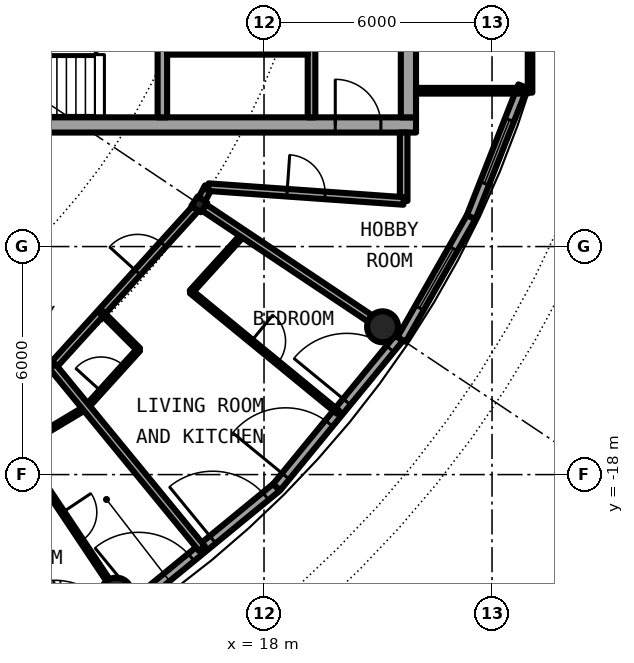
"""IFC4 building model, lengths in metres.
Left out: names, types, materials, properties, quantities, classifications, styles, units other than length and angle.
Written with IfcOpenShell. Run it as: python <this file> out.ifc"""

import sys

from ifc_helpers import new_model, si_unit, direction, frame, frame_2d, origin, origin_2d, place, context, subcontext, project, spatial, rectangle, hollow_circle, i_section, extrude, element, fill, save


model = new_model("IFC4")
c1 = context("Model", 3, precision=1e-05, world=origin(), true_north=direction((0.0, 1.0)))
c2 = subcontext(c1, "Body", "Model", "MODEL_VIEW")
j1 = project(units=[si_unit("LENGTHUNIT", "METRE"), si_unit("PLANEANGLEUNIT", "RADIAN")], contexts=[c1])
p1 = place(None, origin())
s1 = spatial("IfcSite", under=j1, at=p1, CompositionType="ELEMENT")
p2 = place(p1, origin())
s2 = spatial("IfcBuilding", under=s1, at=p2, CompositionType="ELEMENT")
p3 = place(p2, frame((0.0, 0.0, 237.1)))
s3 = spatial("IfcBuildingStorey", under=s2, at=p3, CompositionType="ELEMENT", Elevation=237.1)
for number, where, z_axis, x_axis in (
    (1, (14.112, -21.119, 0.0), (0.0, 0.0, 1.0), (1.0, 0.0, 0.0)),
    (2, (21.119, -14.112, 0.0), (0.0, 0.0, 1.0), (1.0, 0.0, 0.0)),
):
    element("IfcColumn", number, at=place(p3, frame(where, z_axis=z_axis, x_axis=x_axis)), inside=s3, PredefinedType="COLUMN", context=c2, shape_type="SweptSolid", body=[
        extrude(hollow_circle(Radius=0.406, WallThickness=0.03, at=origin_2d()), origin(), (0.0, 0.0, 1.0), 3.05),
    ])
p4 = place(p3, frame((16.297, -10.889, 0.0), z_axis=(0.0, 0.0, 1.0), x_axis=(0.831469612303, -0.55557023302, 0.0)))
e3 = element("IfcColumn", 3, at=p4, inside=s3, PredefinedType="COLUMN", context=c2, shape_type="SweptSolid", body=[
    extrude(i_section(OverallWidth=0.3, OverallDepth=0.3, WebThickness=0.011, FlangeThickness=0.019, FilletRadius=0.027, at=origin_2d()), origin(), (0.0, 0.0, 1.0), 3.05),
])
p5 = place(p3, frame((14.403, -21.556, 0.0), z_axis=(0.0, 0.0, 1.0), x_axis=(0.77306189429, 0.63433059803, 0.0)))
e4 = element("IfcWall", 4, at=p5, inside=s3, PredefinedType="SOLIDWALL", context=c2, shape_type="SweptSolid", body=[
    extrude(rectangle(XDim=5.082, YDim=0.25, at=frame_2d((2.541, 0.0))), origin(), (0.0, 0.0, 1.0), 2.7),
])
p6 = place(p5, frame((0.374, 0.0, 0.0)))
e5 = element("IfcOpeningElement", 5, at=p6, cuts=e4, PredefinedType="OPENING", context=c2, shape_type="SweptSolid", body=[
    extrude(rectangle(XDim=1.8, YDim=2.2, at=frame_2d((0.9, 1.1))), frame((0.0, 0.135, 0.0), z_axis=(0.0, -1.0, 0.0), x_axis=(1.0, 0.0, 0.0)), (0.0, 0.0, 1.0), 0.27),
])
p7 = place(p5, frame((2.909, 0.0, 0.0)))
e6 = element("IfcOpeningElement", 6, at=p7, cuts=e4, PredefinedType="OPENING", context=c2, shape_type="SweptSolid", body=[
    extrude(rectangle(XDim=1.8, YDim=2.2, at=frame_2d((0.9, 1.1))), frame((0.0, 0.135, 0.0), z_axis=(0.0, -1.0, 0.0), x_axis=(1.0, 0.0, 0.0)), (0.0, 0.0, 1.0), 0.27),
])
p8 = place(p3, frame((18.332, -18.332, 0.0), z_axis=(0.0, 0.0, 1.0), x_axis=(0.63433059803, 0.77306189429, 0.0)))
e7 = element("IfcWall", 7, at=p8, inside=s3, PredefinedType="SOLIDWALL", context=c2, shape_type="SweptSolid", body=[
    extrude(rectangle(XDim=5.082, YDim=0.25, at=frame_2d((2.541, 0.0))), origin(), (0.0, 0.0, 1.0), 2.7),
])
p9 = place(p8, frame((0.374, 0.0, 0.0)))
e8 = element("IfcOpeningElement", 8, at=p9, cuts=e7, PredefinedType="OPENING", context=c2, shape_type="SweptSolid", body=[
    extrude(rectangle(XDim=1.8, YDim=2.2, at=frame_2d((0.9, 1.1))), frame((0.0, 0.135, 0.0), z_axis=(0.0, -1.0, 0.0), x_axis=(1.0, 0.0, 0.0)), (0.0, 0.0, 1.0), 0.27),
])
p10 = place(p8, frame((2.909, 0.0, 0.0)))
e9 = element("IfcOpeningElement", 9, at=p10, cuts=e7, PredefinedType="OPENING", context=c2, shape_type="SweptSolid", body=[
    extrude(rectangle(XDim=1.8, YDim=2.2, at=frame_2d((0.9, 1.1))), frame((0.0, 0.135, 0.0), z_axis=(0.0, -1.0, 0.0), x_axis=(1.0, 0.0, 0.0)), (0.0, 0.0, 1.0), 0.27),
])
p11 = place(p3, frame((21.618, -14.445, 0.0), z_axis=(0.0, 0.0, 1.0), x_axis=(0.495031435966, 0.868875064325, 0.0)))
e10 = element("IfcWall", 10, at=p11, inside=s3, PredefinedType="SOLIDWALL", context=c2, shape_type="SweptSolid", body=[
    extrude(rectangle(XDim=3.705, YDim=0.25, at=frame_2d((1.853, 0.0))), origin(), (0.0, 0.0, 1.0), 2.7),
])
p12 = place(p11, frame((0.952, 0.0, 0.3)))
e11 = element("IfcOpeningElement", 11, at=p12, cuts=e10, PredefinedType="OPENING", context=c2, shape_type="SweptSolid", body=[
    extrude(rectangle(XDim=1.8, YDim=2.1, at=frame_2d((0.9, 1.05))), frame((0.0, 0.135, 0.0), z_axis=(0.0, -1.0, 0.0), x_axis=(1.0, 0.0, 0.0)), (0.0, 0.0, 1.0), 0.27),
])
p13 = place(p3, frame((23.452, -11.226, 0.0), z_axis=(0.0, 0.0, 1.0), x_axis=(0.366351636034, 0.930476479432, 0.0)))
e12 = element("IfcWall", 12, at=p13, inside=s3, PredefinedType="SOLIDWALL", context=c2, shape_type="SweptSolid", body=[
    extrude(rectangle(XDim=3.705, YDim=0.25, at=frame_2d((1.852, 0.0))), origin(), (0.0, 0.0, 1.0), 2.7),
])
p14 = place(p13, frame((0.952, 0.0, 0.3)))
e13 = element("IfcOpeningElement", 13, at=p14, cuts=e12, PredefinedType="OPENING", context=c2, shape_type="SweptSolid", body=[
    extrude(rectangle(XDim=1.8, YDim=2.1, at=frame_2d((0.9, 1.05))), frame((0.0, 0.135, 0.0), z_axis=(0.0, -1.0, 0.0), x_axis=(1.0, 0.0, 0.0)), (0.0, 0.0, 1.0), 0.27),
])
p15 = place(p3, frame((8.6, -8.8, 0.0), z_axis=(0.0, 0.0, 1.0), x_axis=(1.0, 0.0, 0.0)))
e14 = element("IfcWall", 14, at=p15, inside=s3, PredefinedType="SHEAR", context=c2, shape_type="SweptSolid", body=[
    extrude(rectangle(XDim=13.4, YDim=0.4, at=frame_2d((6.7, 0.0))), origin(), (0.0, 0.0, 1.0), 3.05),
])
p16 = place(p15, frame((11.275, 0.0, 0.0)))
e15 = element("IfcOpeningElement", 15, at=p16, cuts=e14, PredefinedType="OPENING", context=c2, shape_type="SweptSolid", body=[
    extrude(rectangle(XDim=1.2, YDim=2.3, at=frame_2d((0.6, 1.15))), frame((0.0, 0.21, 0.0), z_axis=(0.0, -1.0, 0.0), x_axis=(1.0, 0.0, 0.0)), (0.0, 0.0, 1.0), 0.42),
])
p17 = place(p3, frame((21.8, 8.6, 0.0), z_axis=(0.0, 0.0, 1.0), x_axis=(0.0, -1.0, 0.0)))
e16 = element("IfcWall", 16, at=p17, inside=s3, PredefinedType="SHEAR", context=c2, shape_type="SweptSolid", body=[
    extrude(rectangle(XDim=17.2, YDim=0.4, at=frame_2d((8.6, 0.0))), origin(), (0.0, 0.0, 1.0), 3.05),
])
p18 = place(p17, frame((7.7, 0.0, 0.0)))
e17 = element("IfcOpeningElement", 17, at=p18, cuts=e16, PredefinedType="OPENING", context=c2, shape_type="SweptSolid", body=[
    extrude(rectangle(XDim=1.8, YDim=2.3, at=frame_2d((0.9, 1.15))), frame((0.0, 0.21, 0.0), z_axis=(0.0, -1.0, 0.0), x_axis=(1.0, 0.0, 0.0)), (0.0, 0.0, 1.0), 0.42),
])
p19 = place(p3, frame((15.325, -8.6, 0.0), z_axis=(0.0, 0.0, 1.0), x_axis=(0.0, 1.0, 0.0)))
e18 = element("IfcWall", 18, at=p19, inside=s3, PredefinedType="SHEAR", context=c2, shape_type="SweptSolid", body=[
    extrude(rectangle(XDim=3.95, YDim=0.25, at=frame_2d((1.975, 0.0))), origin(), (0.0, 0.0, 1.0), 3.05),
])
p20 = place(p19, frame((2.025, 0.0, 0.0)))
e19 = element("IfcOpeningElement", 19, at=p20, cuts=e18, PredefinedType="OPENING", context=c2, shape_type="SweptSolid", body=[
    extrude(rectangle(XDim=1.2, YDim=2.3, at=frame_2d((0.6, 1.15))), frame((0.0, 0.135, 0.0), z_axis=(0.0, -1.0, 0.0), x_axis=(1.0, 0.0, 0.0)), (0.0, 0.0, 1.0), 0.27),
])
p21 = place(p3, frame((19.25, -8.6, 0.0), z_axis=(0.0, 0.0, 1.0), x_axis=(0.0, 1.0, 0.0)))
e20 = element("IfcWall", 20, at=p21, inside=s3, PredefinedType="SOLIDWALL", context=c2, shape_type="SweptSolid", body=[
    extrude(rectangle(XDim=7.025, YDim=0.2, at=frame_2d((3.513, 0.0))), origin(), (0.0, 0.0, 1.0), 2.7),
])
p22 = place(p21, frame((2.35, 0.0, 0.0)))
e21 = element("IfcOpeningElement", 21, at=p22, cuts=e20, PredefinedType="OPENING", context=c2, shape_type="SweptSolid", body=[
    extrude(rectangle(XDim=1.1, YDim=2.3, at=frame_2d((0.55, 1.15))), frame((0.0, 0.11, 0.0), z_axis=(0.0, -1.0, 0.0), x_axis=(1.0, 0.0, 0.0)), (0.0, 0.0, 1.0), 0.22),
])
p23 = place(p3, frame((15.45, -6.875, 0.0), z_axis=(0.0, 0.0, 1.0), x_axis=(1.0, 0.0, 0.0)))
e22 = element("IfcWall", 22, at=p23, inside=s3, PredefinedType="PARTITIONING", context=c2, shape_type="SweptSolid", body=[
    extrude(rectangle(XDim=3.7, YDim=0.15, at=frame_2d((1.85, 0.0))), origin(), (0.0, 0.0, 1.0), 2.7),
])
p24 = place(p23, frame((1.4, 0.0, 0.0)))
e23 = element("IfcOpeningElement", 23, at=p24, cuts=e22, PredefinedType="OPENING", context=c2, shape_type="SweptSolid", body=[
    extrude(rectangle(XDim=0.9, YDim=2.3, at=frame_2d((0.45, 1.15))), frame((0.0, 0.085, 0.0), z_axis=(0.0, -1.0, 0.0), x_axis=(1.0, 0.0, 0.0)), (0.0, 0.0, 1.0), 0.17),
])
p25 = place(p3, frame((22.0, -7.9, 0.0), z_axis=(0.0, 0.0, 1.0), x_axis=(1.0, 0.0, 0.0)))
e24 = element("IfcWall", 24, at=p25, inside=s3, PredefinedType="PARTITIONING", context=c2, shape_type="SweptSolid", body=[
    extrude(rectangle(XDim=2.94, YDim=0.15, at=frame_2d((1.47, 0.0))), origin(), (0.0, 0.0, 1.0), 2.7),
])
p26 = place(p3, frame((25.0, -7.95, 0.0), z_axis=(0.0, 0.0, 1.0), x_axis=(0.0, 1.0, 0.0)))
e25 = element("IfcWall", 25, at=p26, inside=s3, PredefinedType="PARTITIONING", context=c2, shape_type="SweptSolid", body=[
    extrude(rectangle(XDim=15.9, YDim=0.12, at=frame_2d((7.95, 0.0))), origin(), (0.0, 0.0, 1.0), 2.7),
])
p27 = place(p26, frame((0.95, 0.0, 0.1)))
e26 = element("IfcOpeningElement", 26, at=p27, cuts=e25, PredefinedType="OPENING", context=c2, shape_type="SweptSolid", body=[
    extrude(rectangle(XDim=14.0, YDim=2.35, at=frame_2d((7.0, 1.175))), frame((0.0, 0.07, 0.0), z_axis=(0.0, -1.0, 0.0), x_axis=(1.0, 0.0, 0.0)), (0.0, 0.0, 1.0), 0.14),
])
p28 = place(p3, frame((21.675, -10.8, 0.0), z_axis=(0.0, 0.0, 1.0), x_axis=(0.0, 1.0, 0.0)))
e27 = element("IfcWall", 27, at=p28, inside=s3, PredefinedType="PARTITIONING", context=c2, shape_type="SweptSolid", body=[
    extrude(rectangle(XDim=1.8, YDim=0.2, at=frame_2d((0.9, 0.0))), origin(), (0.0, 0.0, 1.0), 2.7),
])
p29 = place(p3, frame((11.56, -17.289, 0.0), z_axis=(0.0, 0.0, 1.0), x_axis=(0.857713062192, 0.514128683254, 0.0)))
e28 = element("IfcWall", 28, at=p29, inside=s3, PredefinedType="PARTITIONING", context=c2, shape_type="SweptSolid", body=[
    extrude(rectangle(XDim=2.054, YDim=0.1, at=frame_2d((1.027, 0.0))), origin(), (0.0, 0.0, 1.0), 2.7),
])
p30 = place(p3, frame((13.322, -16.233, 0.0), z_axis=(0.0, 0.0, 1.0), x_axis=(0.671678456097, 0.74084279818, 0.0)))
e29 = element("IfcWall", 29, at=p30, inside=s3, PredefinedType="PARTITIONING", context=c2, shape_type="SweptSolid", body=[
    extrude(rectangle(XDim=2.054, YDim=0.1, at=frame_2d((1.027, 0.0))), origin(), (0.0, 0.0, 1.0), 2.7),
])
p31 = place(p30, frame((0.577, 0.0, 0.0)))
e30 = element("IfcOpeningElement", 30, at=p31, cuts=e29, PredefinedType="OPENING", context=c2, shape_type="SweptSolid", body=[
    extrude(rectangle(XDim=0.9, YDim=2.3, at=frame_2d((0.45, 1.15))), frame((0.0, 0.06, 0.0), z_axis=(0.0, -1.0, 0.0), x_axis=(1.0, 0.0, 0.0)), (0.0, 0.0, 1.0), 0.12),
])
p32 = place(p3, frame((16.082, -13.189, 0.0), z_axis=(0.0, 0.0, 1.0), x_axis=(0.671678456097, 0.74084279818, 0.0)))
e31 = element("IfcWall", 31, at=p32, inside=s3, PredefinedType="PARTITIONING", context=c2, shape_type="SweptSolid", body=[
    extrude(rectangle(XDim=2.054, YDim=0.1, at=frame_2d((1.027, 0.0))), origin(), (0.0, 0.0, 1.0), 2.7),
])
p33 = place(p3, frame((16.367, -10.756, 0.0), z_axis=(0.0, 0.0, 1.0), x_axis=(0.465802239822, 0.884888848035, 0.0)))
e32 = element("IfcWall", 32, at=p33, inside=s3, PredefinedType="PARTITIONING", context=c2, shape_type="SweptSolid", body=[
    extrude(rectangle(XDim=0.361, YDim=0.2, at=frame_2d((0.18, 0.0))), origin(), (0.0, 0.0, 1.0), 2.7),
])
p34 = place(p3, frame((7.495, -18.111, 0.0), z_axis=(0.0, 0.0, 1.0), x_axis=(0.85773600187, 0.514090411403, 0.0)))
e33 = element("IfcWall", 33, at=p34, inside=s3, PredefinedType="PARTITIONING", context=c2, shape_type="SweptSolid", body=[
    extrude(rectangle(XDim=5.758, YDim=0.2, at=frame_2d((2.879, 0.0))), origin(), (0.0, 0.0, 1.0), 2.45),
])
p35 = place(p34, frame((2.224, 0.0, 0.0)))
e34 = element("IfcOpeningElement", 34, at=p35, cuts=e33, PredefinedType="OPENING", context=c2, shape_type="SweptSolid", body=[
    extrude(rectangle(XDim=1.0, YDim=2.3, at=frame_2d((0.5, 1.15))), frame((0.0, 0.11, 0.0), z_axis=(0.0, -1.0, 0.0), x_axis=(1.0, 0.0, 0.0)), (0.0, 0.0, 1.0), 0.22),
])
p36 = place(p3, frame((12.434, -15.151, 0.0), z_axis=(0.0, 0.0, 1.0), x_axis=(0.671619657805, 0.740896102871, 0.0)))
e35 = element("IfcWall", 35, at=p36, inside=s3, PredefinedType="PARTITIONING", context=c2, shape_type="SweptSolid", body=[
    extrude(rectangle(XDim=5.6, YDim=0.2, at=frame_2d((2.8, 0.0))), origin(), (0.0, 0.0, 1.0), 2.45),
])
p37 = place(p36, frame((3.335, 0.0, 0.0)))
e36 = element("IfcOpeningElement", 36, at=p37, cuts=e35, PredefinedType="OPENING", context=c2, shape_type="SweptSolid", body=[
    extrude(rectangle(XDim=1.0, YDim=2.3, at=frame_2d((0.5, 1.15))), frame((0.0, 0.11, 0.0), z_axis=(0.0, -1.0, 0.0), x_axis=(1.0, 0.0, 0.0)), (0.0, 0.0, 1.0), 0.22),
])
p38 = place(p3, frame((16.535, -10.437, 0.0), z_axis=(0.0, 0.0, 1.0), x_axis=(0.997515141784, -0.070452408845, 0.0)))
e37 = element("IfcWall", 37, at=p38, inside=s3, PredefinedType="PARTITIONING", context=c2, shape_type="SweptSolid", body=[
    extrude(rectangle(XDim=5.153, YDim=0.2, at=frame_2d((2.576, 0.0))), origin(), (0.0, 0.0, 1.0), 2.7),
])
p39 = place(p38, frame((2.076, 0.0, 0.0)))
e38 = element("IfcOpeningElement", 38, at=p39, cuts=e37, PredefinedType="OPENING", context=c2, shape_type="SweptSolid", body=[
    extrude(rectangle(XDim=1.0, YDim=2.3, at=frame_2d((0.5, 1.15))), frame((0.0, 0.11, 0.0), z_axis=(0.0, -1.0, 0.0), x_axis=(1.0, 0.0, 0.0)), (0.0, 0.0, 1.0), 0.22),
])
p40 = place(p3, frame((11.56, -17.289, 0.0), z_axis=(0.0, 0.0, 1.0), x_axis=(0.555959489687, -0.831209387475, 0.0)))
e39 = element("IfcWall", 39, at=p40, inside=s3, PredefinedType="PARTITIONING", context=c2, shape_type="SweptSolid", body=[
    extrude(rectangle(XDim=4.203, YDim=0.1, at=frame_2d((2.102, 0.0))), origin(), (0.0, 0.0, 1.0), 2.7),
])
p41 = place(p40, frame((2.051, 0.0, 0.0)))
e40 = element("IfcOpeningElement", 40, at=p41, cuts=e39, PredefinedType="OPENING", context=c2, shape_type="SweptSolid", body=[
    extrude(rectangle(XDim=0.9, YDim=2.3, at=frame_2d((0.45, 1.15))), frame((0.0, 0.06, 0.0), z_axis=(0.0, -1.0, 0.0), x_axis=(1.0, 0.0, 0.0)), (0.0, 0.0, 1.0), 0.12),
])
p42 = place(p3, frame((12.432, -15.153, 0.0), z_axis=(0.0, 0.0, 1.0), x_axis=(0.634356436091, -0.773040692324, 0.0)))
e41 = element("IfcWall", 41, at=p42, inside=s3, PredefinedType="PARTITIONING", context=c2, shape_type="SweptSolid", body=[
    extrude(rectangle(XDim=6.2, YDim=0.2, at=frame_2d((3.1, 0.0))), origin(), (0.0, 0.0, 1.0), 2.7),
])
p43 = place(p3, frame((13.722, -13.73, 0.0), z_axis=(0.0, 0.0, 1.0), x_axis=(0.707458838269, -0.706754548733, 0.0)))
e42 = element("IfcWall", 42, at=p43, inside=s3, PredefinedType="PARTITIONING", context=c2, shape_type="SweptSolid", body=[
    extrude(rectangle(XDim=1.386, YDim=0.1, at=frame_2d((0.693, 0.0))), origin(), (0.0, 0.0, 1.0), 2.7),
])
p44 = place(p3, frame((16.081, -13.189, 0.0), z_axis=(0.0, 0.0, 1.0), x_axis=(0.773226150619, -0.634130365145, 0.0)))
e43 = element("IfcWall", 43, at=p44, inside=s3, PredefinedType="PARTITIONING", context=c2, shape_type="SweptSolid", body=[
    extrude(rectangle(XDim=5.002, YDim=0.1, at=frame_2d((2.501, 0.0))), origin(), (0.0, 0.0, 1.0), 2.7),
])
p45 = place(p44, frame((2.051, 0.0, 0.0)))
e44 = element("IfcOpeningElement", 44, at=p45, cuts=e43, PredefinedType="OPENING", context=c2, shape_type="SweptSolid", body=[
    extrude(rectangle(XDim=0.9, YDim=2.3, at=frame_2d((0.45, 1.15))), frame((0.0, 0.06, 0.0), z_axis=(0.0, -1.0, 0.0), x_axis=(1.0, 0.0, 0.0)), (0.0, 0.0, 1.0), 0.12),
])
p46 = place(p3, frame((16.422, -10.972, 0.0), z_axis=(0.0, 0.0, 1.0), x_axis=(0.831406006746, -0.555665413668, 0.0)))
e45 = element("IfcWall", 45, at=p46, inside=s3, PredefinedType="PARTITIONING", context=c2, shape_type="SweptSolid", body=[
    extrude(rectangle(XDim=5.251, YDim=0.2, at=frame_2d((2.625, 0.0))), origin(), (0.0, 0.0, 1.0), 2.7),
])
p47 = place(p6, origin())
e46 = element("IfcDoor", 46, at=p47, inside=s3, OperationType="SINGLE_SWING_LEFT", PredefinedType="DOOR", context=c2, shape_type="SweptSolid", body=[
    extrude(rectangle(XDim=1.8, YDim=2.2, at=frame_2d((0.9, 1.1))), frame((0.0, 0.025, 0.0), z_axis=(0.0, -1.0, 0.0), x_axis=(1.0, 0.0, 0.0)), (0.0, 0.0, 1.0), 0.05),
])
fill(e5, e46)
p48 = place(p7, origin())
e47 = element("IfcDoor", 47, at=p48, inside=s3, OperationType="SINGLE_SWING_LEFT", PredefinedType="DOOR", context=c2, shape_type="SweptSolid", body=[
    extrude(rectangle(XDim=1.8, YDim=2.2, at=frame_2d((0.9, 1.1))), frame((0.0, 0.025, 0.0), z_axis=(0.0, -1.0, 0.0), x_axis=(1.0, 0.0, 0.0)), (0.0, 0.0, 1.0), 0.05),
])
fill(e6, e47)
p49 = place(p9, origin())
e48 = element("IfcDoor", 48, at=p49, inside=s3, OperationType="SINGLE_SWING_LEFT", PredefinedType="DOOR", context=c2, shape_type="SweptSolid", body=[
    extrude(rectangle(XDim=1.8, YDim=2.2, at=frame_2d((0.9, 1.1))), frame((0.0, 0.025, 0.0), z_axis=(0.0, -1.0, 0.0), x_axis=(1.0, 0.0, 0.0)), (0.0, 0.0, 1.0), 0.05),
])
fill(e8, e48)
p50 = place(p10, origin())
e49 = element("IfcDoor", 49, at=p50, inside=s3, OperationType="SINGLE_SWING_LEFT", PredefinedType="DOOR", context=c2, shape_type="SweptSolid", body=[
    extrude(rectangle(XDim=1.8, YDim=2.2, at=frame_2d((0.9, 1.1))), frame((0.0, 0.025, 0.0), z_axis=(0.0, -1.0, 0.0), x_axis=(1.0, 0.0, 0.0)), (0.0, 0.0, 1.0), 0.05),
])
fill(e9, e49)
p51 = place(p12, origin())
e50 = element("IfcWindow", 50, at=p51, inside=s3, PartitioningType="SINGLE_PANEL", PredefinedType="WINDOW", context=c2, shape_type="SweptSolid", body=[
    extrude(rectangle(XDim=1.8, YDim=2.1, at=frame_2d((0.9, 1.05))), frame((0.0, 0.03, 0.0), z_axis=(0.0, -1.0, 0.0), x_axis=(1.0, 0.0, 0.0)), (0.0, 0.0, 1.0), 0.06),
])
fill(e11, e50)
p52 = place(p14, origin())
e51 = element("IfcWindow", 51, at=p52, inside=s3, PartitioningType="SINGLE_PANEL", PredefinedType="WINDOW", context=c2, shape_type="SweptSolid", body=[
    extrude(rectangle(XDim=1.8, YDim=2.1, at=frame_2d((0.9, 1.05))), frame((0.0, 0.03, 0.0), z_axis=(0.0, -1.0, 0.0), x_axis=(1.0, 0.0, 0.0)), (0.0, 0.0, 1.0), 0.06),
])
fill(e13, e51)
p53 = place(p24, origin())
e52 = element("IfcDoor", 52, at=p53, inside=s3, OperationType="SINGLE_SWING_LEFT", PredefinedType="DOOR", context=c2, shape_type="SweptSolid", body=[
    extrude(rectangle(XDim=0.9, YDim=2.3, at=frame_2d((0.45, 1.15))), frame((0.0, 0.025, 0.0), z_axis=(0.0, -1.0, 0.0), x_axis=(1.0, 0.0, 0.0)), (0.0, 0.0, 1.0), 0.05),
])
fill(e23, e52)
p54 = place(p16, origin())
e53 = element("IfcDoor", 53, at=p54, inside=s3, OperationType="SINGLE_SWING_LEFT", PredefinedType="DOOR", context=c2, shape_type="SweptSolid", body=[
    extrude(rectangle(XDim=1.2, YDim=2.3, at=frame_2d((0.6, 1.15))), frame((0.0, 0.025, 0.0), z_axis=(0.0, -1.0, 0.0), x_axis=(1.0, 0.0, 0.0)), (0.0, 0.0, 1.0), 0.05),
])
fill(e15, e53)
p55 = place(p27, origin())
e54 = element("IfcWindow", 54, at=p55, inside=s3, PartitioningType="SINGLE_PANEL", PredefinedType="WINDOW", context=c2, shape_type="SweptSolid", body=[
    extrude(rectangle(XDim=14.0, YDim=2.35, at=frame_2d((7.0, 1.175))), frame((0.0, 0.03, 0.0), z_axis=(0.0, -1.0, 0.0), x_axis=(1.0, 0.0, 0.0)), (0.0, 0.0, 1.0), 0.06),
])
fill(e26, e54)
p56 = place(p41, origin())
e55 = element("IfcDoor", 55, at=p56, inside=s3, OperationType="SINGLE_SWING_RIGHT", PredefinedType="DOOR", context=c2, shape_type="SweptSolid", body=[
    extrude(rectangle(XDim=0.9, YDim=2.3, at=frame_2d((0.45, 1.15))), frame((0.0, 0.025, 0.0), z_axis=(0.0, -1.0, 0.0), x_axis=(1.0, 0.0, 0.0)), (0.0, 0.0, 1.0), 0.05),
])
fill(e40, e55)
p57 = place(p37, origin())
e56 = element("IfcDoor", 56, at=p57, inside=s3, OperationType="SINGLE_SWING_RIGHT", PredefinedType="DOOR", context=c2, shape_type="SweptSolid", body=[
    extrude(rectangle(XDim=1.0, YDim=2.3, at=frame_2d((0.5, 1.15))), frame((0.0, 0.025, 0.0), z_axis=(0.0, -1.0, 0.0), x_axis=(1.0, 0.0, 0.0)), (0.0, 0.0, 1.0), 0.05),
])
fill(e36, e56)
p58 = place(p31, origin())
e57 = element("IfcDoor", 57, at=p58, inside=s3, OperationType="SINGLE_SWING_LEFT", PredefinedType="DOOR", context=c2, shape_type="SweptSolid", body=[
    extrude(rectangle(XDim=0.9, YDim=2.3, at=frame_2d((0.45, 1.15))), frame((0.0, 0.025, 0.0), z_axis=(0.0, -1.0, 0.0), x_axis=(1.0, 0.0, 0.0)), (0.0, 0.0, 1.0), 0.05),
])
fill(e30, e57)
p59 = place(p45, origin())
e58 = element("IfcDoor", 58, at=p59, inside=s3, OperationType="SINGLE_SWING_LEFT", PredefinedType="DOOR", context=c2, shape_type="SweptSolid", body=[
    extrude(rectangle(XDim=0.9, YDim=2.3, at=frame_2d((0.45, 1.15))), frame((0.0, 0.025, 0.0), z_axis=(0.0, -1.0, 0.0), x_axis=(1.0, 0.0, 0.0)), (0.0, 0.0, 1.0), 0.05),
])
fill(e44, e58)
p60 = place(p39, origin())
e59 = element("IfcDoor", 59, at=p60, inside=s3, OperationType="SINGLE_SWING_LEFT", PredefinedType="DOOR", context=c2, shape_type="SweptSolid", body=[
    extrude(rectangle(XDim=1.0, YDim=2.3, at=frame_2d((0.5, 1.15))), frame((0.0, 0.025, 0.0), z_axis=(0.0, -1.0, 0.0), x_axis=(1.0, 0.0, 0.0)), (0.0, 0.0, 1.0), 0.05),
])
fill(e38, e59)
save(model, sys.argv[1])
